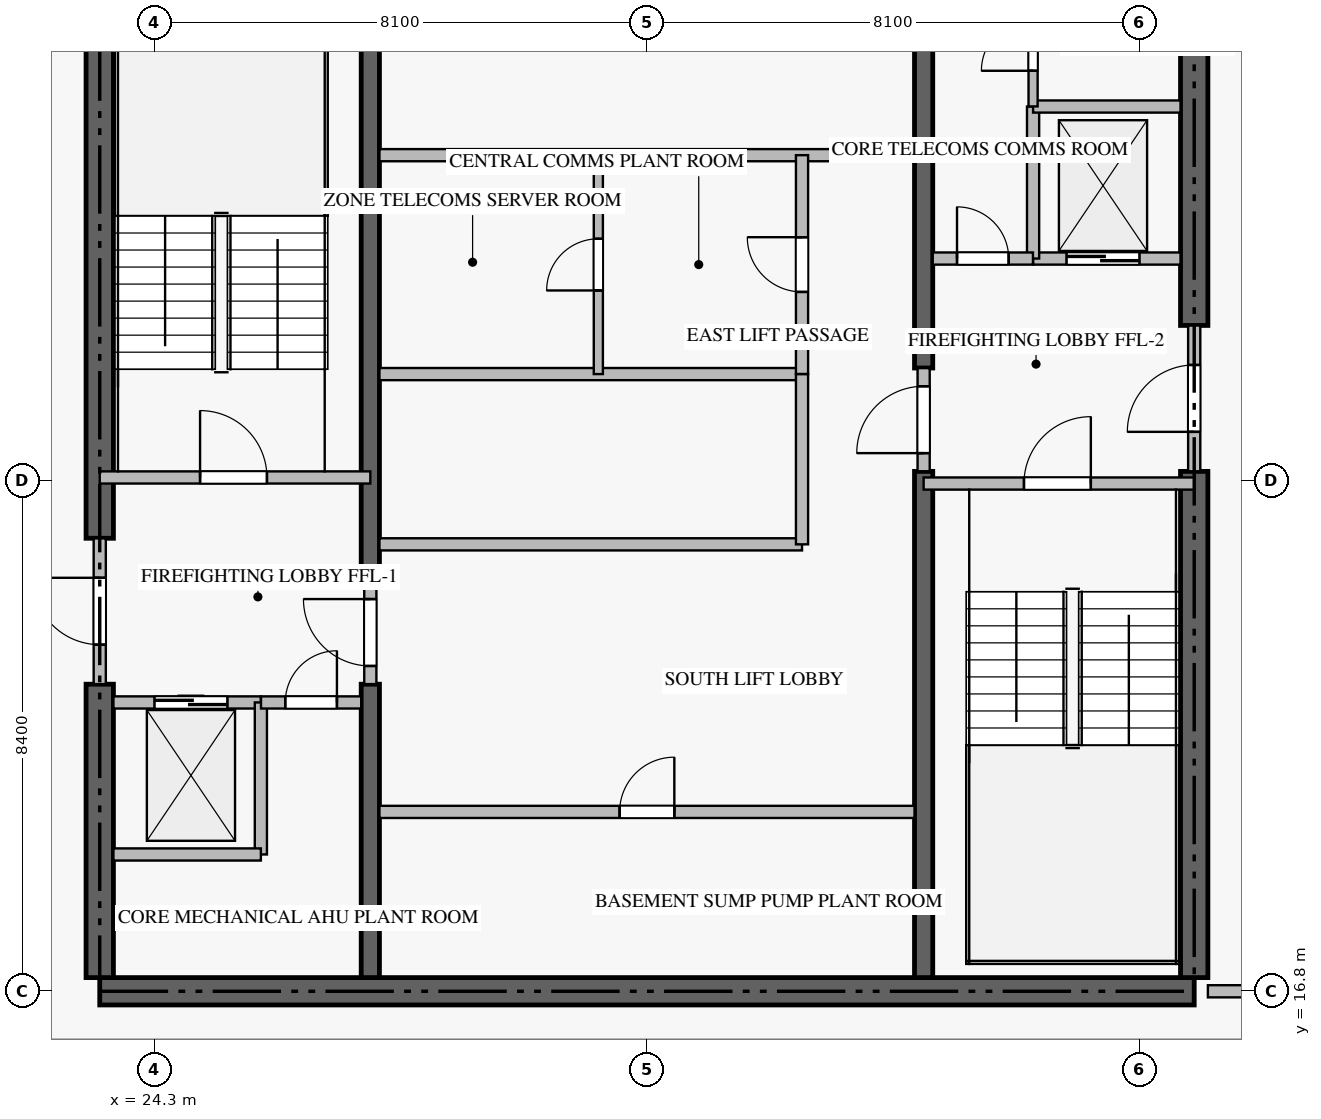
"""IFC4 building model, lengths in metres.
Left out: names, types, materials, properties, quantities, classifications, styles, units other than length and angle.
Written with IfcOpenShell. Run it as: python <this file> out.ifc"""

import sys

from ifc_helpers import new_model, si_unit, direction, frame, frame_2d, origin, place, context, subcontext, project, spatial, rectangle, extrude, source, transform, mapped, element, fill, save


model = new_model("IFC4")
c1 = context("Model", 3, precision=1e-05, world=origin(), true_north=direction((0.0, 1.0)))
c2 = subcontext(c1, "Body", "Model", "MODEL_VIEW")
j1 = project(units=[si_unit("LENGTHUNIT", "METRE"), si_unit("PLANEANGLEUNIT", "RADIAN")], contexts=[c1])
p1 = place(None, origin())
s1 = spatial("IfcSite", under=j1, at=p1, CompositionType="ELEMENT")
p2 = place(p1, origin())
s2 = spatial("IfcBuilding", under=s1, at=p2, CompositionType="ELEMENT")
p3 = place(p2, frame((0.0, 0.0, -10.8)))
s3 = spatial("IfcBuildingStorey", under=s2, at=p3, CompositionType="ELEMENT", Elevation=-10.8)
p4 = place(p3, frame((23.4, 16.8, 0.0), z_axis=(0.0, 0.0, 1.0), x_axis=(1.0, 0.0, 0.0)))
e1 = element("IfcWall", 1, at=p4, inside=s3, PredefinedType="SHEAR", context=c2, shape_type="SweptSolid", body=[
    extrude(rectangle(XDim=18.0, YDim=0.45, at=frame_2d((9.0, 0.0))), origin(), (0.0, 0.0, 1.0), 3.238),
])
p5 = place(p3, frame((23.4, 17.025, 0.0), z_axis=(0.0, 0.0, 1.0), x_axis=(0.0, 1.0, 0.0)))
e2 = element("IfcWall", 2, at=p5, inside=s3, PredefinedType="SHEAR", context=c2, shape_type="SweptSolid", body=[
    extrude(rectangle(XDim=4.825, YDim=0.45, at=frame_2d((2.413, 0.0))), origin(), (0.0, 0.0, 1.0), 3.238),
])
p6 = place(p3, frame((23.4, 24.25, 0.0), z_axis=(0.0, 0.0, 1.0), x_axis=(0.0, 1.0, 0.0)))
e3 = element("IfcWall", 3, at=p6, inside=s3, PredefinedType="SHEAR", context=c2, shape_type="SweptSolid", body=[
    extrude(rectangle(XDim=9.125, YDim=0.45, at=frame_2d((4.562, 0.0))), origin(), (0.0, 0.0, 1.0), 3.238),
])
p7 = place(p3, frame((41.4, 17.025, 0.0), z_axis=(0.0, 0.0, 1.0), x_axis=(0.0, 1.0, 0.0)))
e4 = element("IfcWall", 4, at=p7, inside=s3, PredefinedType="SHEAR", context=c2, shape_type="SweptSolid", body=[
    extrude(rectangle(XDim=8.325, YDim=0.45, at=frame_2d((4.163, 0.0))), origin(), (0.0, 0.0, 1.0), 3.238),
])
p8 = place(p3, frame((41.4, 27.75, 0.0), z_axis=(0.0, 0.0, 1.0), x_axis=(0.0, 1.0, 0.0)))
e5 = element("IfcWall", 5, at=p8, inside=s3, PredefinedType="SHEAR", context=c2, shape_type="SweptSolid", body=[
    extrude(rectangle(XDim=5.625, YDim=0.45, at=frame_2d((2.812, 0.0))), origin(), (0.0, 0.0, 1.0), 3.238),
])
p9 = place(p3, frame((27.85, 17.025, 0.0), z_axis=(0.0, 0.0, 1.0), x_axis=(0.0, 1.0, 0.0)))
e6 = element("IfcWall", 6, at=p9, inside=s3, PredefinedType="SHEAR", context=c2, shape_type="SweptSolid", body=[
    extrude(rectangle(XDim=4.825, YDim=0.3, at=frame_2d((2.413, 0.0))), origin(), (0.0, 0.0, 1.0), 3.238),
])
p10 = place(p3, frame((27.85, 23.55, 0.0), z_axis=(0.0, 0.0, 1.0), x_axis=(0.0, 1.0, 0.0)))
e7 = element("IfcWall", 7, at=p10, inside=s3, PredefinedType="SHEAR", context=c2, shape_type="SweptSolid", body=[
    extrude(rectangle(XDim=9.825, YDim=0.3, at=frame_2d((4.913, 0.0))), origin(), (0.0, 0.0, 1.0), 3.238),
])
p11 = place(p3, frame((36.95, 17.025, 0.0), z_axis=(0.0, 0.0, 1.0), x_axis=(0.0, 1.0, 0.0)))
e8 = element("IfcWall", 8, at=p11, inside=s3, PredefinedType="SHEAR", context=c2, shape_type="SweptSolid", body=[
    extrude(rectangle(XDim=8.325, YDim=0.3, at=frame_2d((4.163, 0.0))), origin(), (0.0, 0.0, 1.0), 3.238),
])
p12 = place(p3, frame((36.95, 27.05, 0.0), z_axis=(0.0, 0.0, 1.0), x_axis=(0.0, 1.0, 0.0)))
e9 = element("IfcWall", 9, at=p12, inside=s3, PredefinedType="SHEAR", context=c2, shape_type="SweptSolid", body=[
    extrude(rectangle(XDim=6.325, YDim=0.3, at=frame_2d((3.163, 0.0))), origin(), (0.0, 0.0, 1.0), 3.238),
])
p13 = place(p3, frame((23.4, 25.25, 0.0), z_axis=(0.0, 0.0, 1.0), x_axis=(1.0, 0.0, 0.0)))
e10 = element("IfcWall", 10, at=p13, inside=s3, PredefinedType="STANDARD", context=c2, shape_type="SweptSolid", body=[
    extrude(rectangle(XDim=4.45, YDim=0.2, at=frame_2d((2.225, 0.0))), origin(), (0.0, 0.0, 1.0), 3.24),
])
p14 = place(p13, frame((1.65, 0.0, 0.0)))
e11 = element("IfcOpeningElement", 11, at=p14, cuts=e10, PredefinedType="OPENING", context=c2, shape_type="SweptSolid", body=[
    extrude(rectangle(XDim=1.1, YDim=2.15, at=frame_2d((0.55, 1.075))), frame((0.0, 0.11, 0.0), z_axis=(0.0, -1.0, 0.0), x_axis=(1.0, 0.0, 0.0)), (0.0, 0.0, 1.0), 0.22),
])
p15 = place(p3, frame((36.95, 25.15, 0.0), z_axis=(0.0, 0.0, 1.0), x_axis=(1.0, 0.0, 0.0)))
e12 = element("IfcWall", 12, at=p15, inside=s3, PredefinedType="STANDARD", context=c2, shape_type="SweptSolid", body=[
    extrude(rectangle(XDim=4.45, YDim=0.2, at=frame_2d((2.225, 0.0))), origin(), (0.0, 0.0, 1.0), 3.24),
])
p16 = place(p15, frame((1.65, 0.0, 0.0)))
e13 = element("IfcOpeningElement", 13, at=p16, cuts=e12, PredefinedType="OPENING", context=c2, shape_type="SweptSolid", body=[
    extrude(rectangle(XDim=1.1, YDim=2.15, at=frame_2d((0.55, 1.075))), frame((0.0, 0.11, 0.0), z_axis=(0.0, -1.0, 0.0), x_axis=(1.0, 0.0, 0.0)), (0.0, 0.0, 1.0), 0.22),
])
p17 = place(p3, frame((23.625, 21.55, 0.0), z_axis=(0.0, 0.0, 1.0), x_axis=(1.0, 0.0, 0.0)))
e14 = element("IfcWall", 14, at=p17, inside=s3, PredefinedType="STANDARD", context=c2, shape_type="SweptSolid", body=[
    extrude(rectangle(XDim=2.425, YDim=0.2, at=frame_2d((1.212, 0.0))), origin(), (0.0, 0.0, 1.0), 3.24),
])
p18 = place(p17, frame((0.675, 0.0, 0.0)))
e15 = element("IfcOpeningElement", 15, at=p18, cuts=e14, PredefinedType="OPENING", context=c2, shape_type="SweptSolid", body=[
    extrude(rectangle(XDim=1.2, YDim=2.2, at=frame_2d((0.6, 1.1))), frame((0.0, 0.11, 0.0), z_axis=(0.0, -1.0, 0.0), x_axis=(1.0, 0.0, 0.0)), (0.0, 0.0, 1.0), 0.22),
])
p19 = place(p3, frame((38.75, 28.85, 0.0), z_axis=(0.0, 0.0, 1.0), x_axis=(1.0, 0.0, 0.0)))
e16 = element("IfcWall", 16, at=p19, inside=s3, PredefinedType="STANDARD", context=c2, shape_type="SweptSolid", body=[
    extrude(rectangle(XDim=2.425, YDim=0.2, at=frame_2d((1.212, 0.0))), origin(), (0.0, 0.0, 1.0), 3.24),
])
p20 = place(p19, frame((0.55, 0.0, 0.0)))
e17 = element("IfcOpeningElement", 17, at=p20, cuts=e16, PredefinedType="OPENING", context=c2, shape_type="SweptSolid", body=[
    extrude(rectangle(XDim=1.2, YDim=2.2, at=frame_2d((0.6, 1.1))), frame((0.0, 0.11, 0.0), z_axis=(0.0, -1.0, 0.0), x_axis=(1.0, 0.0, 0.0)), (0.0, 0.0, 1.0), 0.22),
])
p21 = place(p3, frame((26.05, 19.05, 0.0), z_axis=(0.0, 0.0, 1.0), x_axis=(0.0, 1.0, 0.0)))
e18 = element("IfcWall", 18, at=p21, inside=s3, PredefinedType="STANDARD", context=c2, shape_type="SweptSolid", body=[
    extrude(rectangle(XDim=2.5, YDim=0.2, at=frame_2d((1.25, 0.0))), origin(), (0.0, 0.0, 1.0), 3.24),
])
p22 = place(p3, frame((23.625, 19.05, 0.0), z_axis=(0.0, 0.0, 1.0), x_axis=(1.0, 0.0, 0.0)))
e19 = element("IfcWall", 19, at=p22, inside=s3, PredefinedType="STANDARD", context=c2, shape_type="SweptSolid", body=[
    extrude(rectangle(XDim=2.425, YDim=0.2, at=frame_2d((1.212, 0.0))), origin(), (0.0, 0.0, 1.0), 3.24),
])
p23 = place(p3, frame((26.052, 21.55, 0.0), z_axis=(0.0, 0.0, 1.0), x_axis=(1.0, 0.0, 0.0)))
e20 = element("IfcWall", 20, at=p23, inside=s3, PredefinedType="STANDARD", context=c2, shape_type="SweptSolid", body=[
    extrude(rectangle(XDim=1.648, YDim=0.2, at=frame_2d((0.824, 0.0))), origin(), (0.0, 0.0, 1.0), 3.24),
])
p24 = place(p23, frame((0.399, 0.0, 0.0)))
e21 = element("IfcOpeningElement", 21, at=p24, cuts=e20, PredefinedType="OPENING", context=c2, shape_type="SweptSolid", body=[
    extrude(rectangle(XDim=0.85, YDim=2.1, at=frame_2d((0.425, 1.05))), frame((0.0, 0.11, 0.0), z_axis=(0.0, -1.0, 0.0), x_axis=(1.0, 0.0, 0.0)), (0.0, 0.0, 1.0), 0.22),
])
p25 = place(p3, frame((38.75, 28.85, 0.0), z_axis=(0.0, 0.0, 1.0), x_axis=(0.0, 1.0, 0.0)))
e22 = element("IfcWall", 22, at=p25, inside=s3, PredefinedType="STANDARD", context=c2, shape_type="SweptSolid", body=[
    extrude(rectangle(XDim=2.5, YDim=0.2, at=frame_2d((1.25, 0.0))), origin(), (0.0, 0.0, 1.0), 3.24),
])
p26 = place(p3, frame((38.75, 31.35, 0.0), z_axis=(0.0, 0.0, 1.0), x_axis=(1.0, 0.0, 0.0)))
e23 = element("IfcWall", 23, at=p26, inside=s3, PredefinedType="STANDARD", context=c2, shape_type="SweptSolid", body=[
    extrude(rectangle(XDim=2.425, YDim=0.2, at=frame_2d((1.212, 0.0))), origin(), (0.0, 0.0, 1.0), 3.24),
])
p27 = place(p3, frame((37.1, 28.85, 0.0), z_axis=(0.0, 0.0, 1.0), x_axis=(1.0, 0.0, 0.0)))
e24 = element("IfcWall", 24, at=p27, inside=s3, PredefinedType="STANDARD", context=c2, shape_type="SweptSolid", body=[
    extrude(rectangle(XDim=1.648, YDim=0.2, at=frame_2d((0.824, 0.0))), origin(), (0.0, 0.0, 1.0), 3.24),
])
p28 = place(p27, frame((0.399, 0.0, 0.0)))
e25 = element("IfcOpeningElement", 25, at=p28, cuts=e24, PredefinedType="OPENING", context=c2, shape_type="SweptSolid", body=[
    extrude(rectangle(XDim=0.85, YDim=2.1, at=frame_2d((0.425, 1.05))), frame((0.0, 0.11, 0.0), z_axis=(0.0, -1.0, 0.0), x_axis=(1.0, 0.0, 0.0)), (0.0, 0.0, 1.0), 0.22),
])
p29 = place(p3, frame((23.4, 21.852, 0.0), z_axis=(0.0, 0.0, 1.0), x_axis=(0.0, 1.0, 0.0)))
e26 = element("IfcWall", 26, at=p29, inside=s3, PredefinedType="STANDARD", context=c2, shape_type="SweptSolid", body=[
    extrude(rectangle(XDim=2.396, YDim=0.2, at=frame_2d((1.198, 0.0))), origin(), (0.0, 0.0, 1.0), 3.24),
])
p30 = place(p29, frame((0.648, 0.0, 0.0)))
e27 = element("IfcOpeningElement", 27, at=p30, cuts=e26, PredefinedType="OPENING", context=c2, shape_type="SweptSolid", body=[
    extrude(rectangle(XDim=1.1, YDim=2.15, at=frame_2d((0.55, 1.075))), frame((0.0, 0.11, 0.0), z_axis=(0.0, -1.0, 0.0), x_axis=(1.0, 0.0, 0.0)), (0.0, 0.0, 1.0), 0.22),
])
p31 = place(p3, frame((41.4, 25.352, 0.0), z_axis=(0.0, 0.0, 1.0), x_axis=(0.0, 1.0, 0.0)))
e28 = element("IfcWall", 28, at=p31, inside=s3, PredefinedType="STANDARD", context=c2, shape_type="SweptSolid", body=[
    extrude(rectangle(XDim=2.396, YDim=0.2, at=frame_2d((1.198, 0.0))), origin(), (0.0, 0.0, 1.0), 3.24),
])
p32 = place(p31, frame((0.648, 0.0, 0.0)))
e29 = element("IfcOpeningElement", 29, at=p32, cuts=e28, PredefinedType="OPENING", context=c2, shape_type="SweptSolid", body=[
    extrude(rectangle(XDim=1.1, YDim=2.15, at=frame_2d((0.55, 1.075))), frame((0.0, 0.11, 0.0), z_axis=(0.0, -1.0, 0.0), x_axis=(1.0, 0.0, 0.0)), (0.0, 0.0, 1.0), 0.22),
])
p33 = place(p3, frame((27.85, 21.852, 0.0), z_axis=(0.0, 0.0, 1.0), x_axis=(0.0, 1.0, 0.0)))
e30 = element("IfcWall", 30, at=p33, inside=s3, PredefinedType="STANDARD", context=c2, shape_type="SweptSolid", body=[
    extrude(rectangle(XDim=1.696, YDim=0.2, at=frame_2d((0.848, 0.0))), origin(), (0.0, 0.0, 1.0), 3.24),
])
p34 = place(p33, frame((0.298, 0.0, 0.0)))
e31 = element("IfcOpeningElement", 31, at=p34, cuts=e30, PredefinedType="OPENING", context=c2, shape_type="SweptSolid", body=[
    extrude(rectangle(XDim=1.1, YDim=2.15, at=frame_2d((0.55, 1.075))), frame((0.0, 0.11, 0.0), z_axis=(0.0, -1.0, 0.0), x_axis=(1.0, 0.0, 0.0)), (0.0, 0.0, 1.0), 0.22),
])
p35 = place(p3, frame((36.95, 25.352, 0.0), z_axis=(0.0, 0.0, 1.0), x_axis=(0.0, 1.0, 0.0)))
e32 = element("IfcWall", 32, at=p35, inside=s3, PredefinedType="STANDARD", context=c2, shape_type="SweptSolid", body=[
    extrude(rectangle(XDim=1.696, YDim=0.2, at=frame_2d((0.848, 0.0))), origin(), (0.0, 0.0, 1.0), 3.24),
])
p36 = place(p35, frame((0.298, 0.0, 0.0)))
e33 = element("IfcOpeningElement", 33, at=p36, cuts=e32, PredefinedType="OPENING", context=c2, shape_type="SweptSolid", body=[
    extrude(rectangle(XDim=1.1, YDim=2.15, at=frame_2d((0.55, 1.075))), frame((0.0, 0.11, 0.0), z_axis=(0.0, -1.0, 0.0), x_axis=(1.0, 0.0, 0.0)), (0.0, 0.0, 1.0), 0.22),
])
p37 = place(p3, frame((28.0, 30.55, 0.0), z_axis=(0.0, 0.0, 1.0), x_axis=(1.0, 0.0, 0.0)))
e34 = element("IfcWall", 34, at=p37, inside=s3, PredefinedType="STANDARD", context=c2, shape_type="SweptSolid", body=[
    extrude(rectangle(XDim=8.8, YDim=0.2, at=frame_2d((4.4, 0.0))), origin(), (0.0, 0.0, 1.0), 3.24),
])
p38 = place(p3, frame((28.0, 19.75, 0.0), z_axis=(0.0, 0.0, 1.0), x_axis=(1.0, 0.0, 0.0)))
e35 = element("IfcWall", 35, at=p38, inside=s3, PredefinedType="STANDARD", context=c2, shape_type="SweptSolid", body=[
    extrude(rectangle(XDim=8.8, YDim=0.2, at=frame_2d((4.4, 0.0))), origin(), (0.0, 0.0, 1.0), 3.24),
])
p39 = place(p38, frame((3.95, 0.0, 0.0)))
e36 = element("IfcOpeningElement", 36, at=p39, cuts=e35, PredefinedType="OPENING", context=c2, shape_type="SweptSolid", body=[
    extrude(rectangle(XDim=0.9, YDim=2.1, at=frame_2d((0.45, 1.05))), frame((0.0, 0.11, 0.0), z_axis=(0.0, -1.0, 0.0), x_axis=(1.0, 0.0, 0.0)), (0.0, 0.0, 1.0), 0.22),
])
for number, where, z_axis, x_axis in (
    (37, (28.0, 24.15, 0.0), (0.0, 0.0, 1.0), (1.0, 0.0, 0.0)),
    (38, (28.0, 26.95, 0.0), (0.0, 0.0, 1.0), (1.0, 0.0, 0.0)),
):
    element("IfcWall", number, at=place(p3, frame(where, z_axis=z_axis, x_axis=x_axis)), inside=s3, PredefinedType="STANDARD", context=c2, shape_type="SweptSolid", body=[
        extrude(rectangle(XDim=6.95, YDim=0.2, at=frame_2d((3.475, 0.0))), origin(), (0.0, 0.0, 1.0), 3.24),
    ])
p40 = place(p3, frame((34.95, 24.15, 0.0), z_axis=(0.0, 0.0, 1.0), x_axis=(0.0, 1.0, 0.0)))
e39 = element("IfcWall", 39, at=p40, inside=s3, PredefinedType="STANDARD", context=c2, shape_type="SweptSolid", body=[
    extrude(rectangle(XDim=2.8, YDim=0.2, at=frame_2d((1.4, 0.0))), origin(), (0.0, 0.0, 1.0), 3.24),
])
p41 = place(p3, frame((38.75, 31.352, 0.0), z_axis=(0.0, 0.0, 1.0), x_axis=(0.0, 1.0, 0.0)))
e40 = element("IfcWall", 40, at=p41, inside=s3, PredefinedType="PARTITIONING", context=c2, shape_type="SweptSolid", body=[
    extrude(rectangle(XDim=2.023, YDim=0.15, at=frame_2d((1.011, 0.0))), origin(), (0.0, 0.0, 1.0), 3.24),
])
p42 = place(p41, frame((0.586, 0.0, 0.0)))
e41 = element("IfcOpeningElement", 41, at=p42, cuts=e40, PredefinedType="OPENING", context=c2, shape_type="SweptSolid", body=[
    extrude(rectangle(XDim=0.85, YDim=2.1, at=frame_2d((0.425, 1.05))), frame((0.0, 0.085, 0.0), z_axis=(0.0, -1.0, 0.0), x_axis=(1.0, 0.0, 0.0)), (0.0, 0.0, 1.0), 0.17),
])
p43 = place(p3, frame((34.95, 26.952, 0.0), z_axis=(0.0, 0.0, 1.0), x_axis=(0.0, 1.0, 0.0)))
e42 = element("IfcWall", 42, at=p43, inside=s3, PredefinedType="STANDARD", context=c2, shape_type="SweptSolid", body=[
    extrude(rectangle(XDim=3.598, YDim=0.2, at=frame_2d((1.799, 0.0))), origin(), (0.0, 0.0, 1.0), 3.24),
])
p44 = place(p43, frame((1.349, 0.0, 0.0)))
e43 = element("IfcOpeningElement", 43, at=p44, cuts=e42, PredefinedType="OPENING", context=c2, shape_type="SweptSolid", body=[
    extrude(rectangle(XDim=0.9, YDim=2.1, at=frame_2d((0.45, 1.05))), frame((0.0, 0.11, 0.0), z_axis=(0.0, -1.0, 0.0), x_axis=(1.0, 0.0, 0.0)), (0.0, 0.0, 1.0), 0.22),
])
p45 = place(p3, frame((31.6, 26.95, 0.0), z_axis=(0.0, 0.0, 1.0), x_axis=(0.0, 1.0, 0.0)))
e44 = element("IfcWall", 44, at=p45, inside=s3, PredefinedType="PARTITIONING", context=c2, shape_type="SweptSolid", body=[
    extrude(rectangle(XDim=3.6, YDim=0.15, at=frame_2d((1.8, 0.0))), origin(), (0.0, 0.0, 1.0), 3.24),
])
p46 = place(p45, frame((1.375, 0.0, 0.0)))
e45 = element("IfcOpeningElement", 45, at=p46, cuts=e44, PredefinedType="OPENING", context=c2, shape_type="SweptSolid", body=[
    extrude(rectangle(XDim=0.85, YDim=2.1, at=frame_2d((0.425, 1.05))), frame((0.0, 0.085, 0.0), z_axis=(0.0, -1.0, 0.0), x_axis=(1.0, 0.0, 0.0)), (0.0, 0.0, 1.0), 0.17),
])
p47 = place(p3, frame((41.625, 16.8, 0.0), z_axis=(0.0, 0.0, 1.0), x_axis=(1.0, 0.0, 0.0)))
e46 = element("IfcWall", 46, at=p47, inside=s3, PredefinedType="STANDARD", context=c2, shape_type="SweptSolid", body=[
    extrude(rectangle(XDim=22.725, YDim=0.2, at=frame_2d((11.363, 0.0))), origin(), (0.0, 0.0, 1.0), 2.672),
])
p48 = place(p47, frame((4.697, 0.0, 0.0)))
e47 = element("IfcOpeningElement", 47, at=p48, cuts=e46, PredefinedType="OPENING", context=c2, shape_type="SweptSolid", body=[
    extrude(rectangle(XDim=3.8, YDim=2.5, at=frame_2d((1.9, 1.25))), frame((0.0, 0.11, 0.0), z_axis=(0.0, -1.0, 0.0), x_axis=(1.0, 0.0, 0.0)), (0.0, 0.0, 1.0), 0.22),
])
m1 = source(origin(), c2, "Body", "SweptSolid", [
    extrude(rectangle(XDim=1.1, YDim=2.15, at=frame_2d((0.55, 1.075))), frame((0.0, 0.025, 0.0), z_axis=(0.0, -1.0, 0.0), x_axis=(1.0, 0.0, 0.0)), (0.0, 0.0, 1.0), 0.05),
])
p49 = place(p14, origin())
e48 = element("IfcDoor", 48, at=p49, inside=s3, OperationType="SINGLE_SWING_LEFT", PredefinedType="DOOR", context=c2, shape_type="MappedRepresentation", body=[
    mapped(m1, transform((0.0, 0.0, 0.0), scale=1.0)),
])
fill(e11, e48)
p50 = place(p16, origin())
e49 = element("IfcDoor", 49, at=p50, inside=s3, OperationType="SINGLE_SWING_RIGHT", PredefinedType="DOOR", context=c2, shape_type="MappedRepresentation", body=[
    mapped(m1, transform((0.0, 0.0, 0.0), scale=1.0)),
])
fill(e13, e49)
m2 = source(origin(), c2, "Body", "SweptSolid", [
    extrude(rectangle(XDim=1.2, YDim=2.2, at=frame_2d((0.6, 1.1))), frame((0.0, 0.025, 0.0), z_axis=(0.0, -1.0, 0.0), x_axis=(1.0, 0.0, 0.0)), (0.0, 0.0, 1.0), 0.05),
])
p51 = place(p18, origin())
e50 = element("IfcDoor", 50, at=p51, inside=s3, OperationType="DOUBLE_DOOR_SLIDING", PredefinedType="DOOR", context=c2, shape_type="MappedRepresentation", body=[
    mapped(m2, transform((0.0, 0.0, 0.0), scale=1.0)),
])
fill(e15, e50)
p52 = place(p20, origin())
e51 = element("IfcDoor", 51, at=p52, inside=s3, OperationType="DOUBLE_DOOR_SLIDING", PredefinedType="DOOR", context=c2, shape_type="MappedRepresentation", body=[
    mapped(m2, transform((0.0, 0.0, 0.0), scale=1.0)),
])
fill(e17, e51)
m3 = source(origin(), c2, "Body", "SweptSolid", [
    extrude(rectangle(XDim=0.85, YDim=2.1, at=frame_2d((0.425, 1.05))), frame((0.0, 0.025, 0.0), z_axis=(0.0, -1.0, 0.0), x_axis=(1.0, 0.0, 0.0)), (0.0, 0.0, 1.0), 0.05),
])
p53 = place(p24, origin())
e52 = element("IfcDoor", 52, at=p53, inside=s3, OperationType="SINGLE_SWING_RIGHT", PredefinedType="DOOR", context=c2, shape_type="MappedRepresentation", body=[
    mapped(m3, transform((0.0, 0.0, 0.0), scale=1.0)),
])
fill(e21, e52)
p54 = place(p28, origin())
e53 = element("IfcDoor", 53, at=p54, inside=s3, OperationType="SINGLE_SWING_LEFT", PredefinedType="DOOR", context=c2, shape_type="MappedRepresentation", body=[
    mapped(m3, transform((0.0, 0.0, 0.0), scale=1.0)),
])
fill(e25, e53)
p55 = place(p30, origin())
e54 = element("IfcDoor", 54, at=p55, inside=s3, OperationType="SINGLE_SWING_RIGHT", PredefinedType="DOOR", context=c2, shape_type="MappedRepresentation", body=[
    mapped(m1, transform((0.0, 0.0, 0.0), scale=1.0)),
])
fill(e27, e54)
p56 = place(p32, origin())
e55 = element("IfcDoor", 55, at=p56, inside=s3, OperationType="SINGLE_SWING_LEFT", PredefinedType="DOOR", context=c2, shape_type="MappedRepresentation", body=[
    mapped(m1, transform((0.0, 0.0, 0.0), scale=1.0)),
])
fill(e29, e55)
p57 = place(p34, origin())
e56 = element("IfcDoor", 56, at=p57, inside=s3, OperationType="SINGLE_SWING_RIGHT", PredefinedType="DOOR", context=c2, shape_type="MappedRepresentation", body=[
    mapped(m1, transform((0.0, 0.0, 0.0), scale=1.0)),
])
fill(e31, e56)
p58 = place(p36, origin())
e57 = element("IfcDoor", 57, at=p58, inside=s3, OperationType="SINGLE_SWING_LEFT", PredefinedType="DOOR", context=c2, shape_type="MappedRepresentation", body=[
    mapped(m1, transform((0.0, 0.0, 0.0), scale=1.0)),
])
fill(e33, e57)
m4 = source(origin(), c2, "Body", "SweptSolid", [
    extrude(rectangle(XDim=0.9, YDim=2.1, at=frame_2d((0.45, 1.05))), frame((0.0, 0.025, 0.0), z_axis=(0.0, -1.0, 0.0), x_axis=(1.0, 0.0, 0.0)), (0.0, 0.0, 1.0), 0.05),
])
p59 = place(p39, origin())
e58 = element("IfcDoor", 58, at=p59, inside=s3, OperationType="SINGLE_SWING_RIGHT", PredefinedType="DOOR", context=c2, shape_type="MappedRepresentation", body=[
    mapped(m4, transform((0.0, 0.0, 0.0), scale=1.0)),
])
fill(e36, e58)
p60 = place(p42, origin())
e59 = element("IfcDoor", 59, at=p60, inside=s3, OperationType="SINGLE_SWING_LEFT", PredefinedType="DOOR", context=c2, shape_type="MappedRepresentation", body=[
    mapped(m3, transform((0.0, 0.0, 0.0), scale=1.0)),
])
fill(e41, e59)
p61 = place(p44, origin())
e60 = element("IfcDoor", 60, at=p61, inside=s3, OperationType="SINGLE_SWING_RIGHT", PredefinedType="DOOR", context=c2, shape_type="MappedRepresentation", body=[
    mapped(m4, transform((0.0, 0.0, 0.0), scale=1.0)),
])
fill(e43, e60)
p62 = place(p46, origin())
e61 = element("IfcDoor", 61, at=p62, inside=s3, OperationType="SINGLE_SWING_LEFT", PredefinedType="DOOR", context=c2, shape_type="MappedRepresentation", body=[
    mapped(m3, transform((0.0, 0.0, 0.0), scale=1.0)),
])
fill(e45, e61)
save(model, sys.argv[1])
